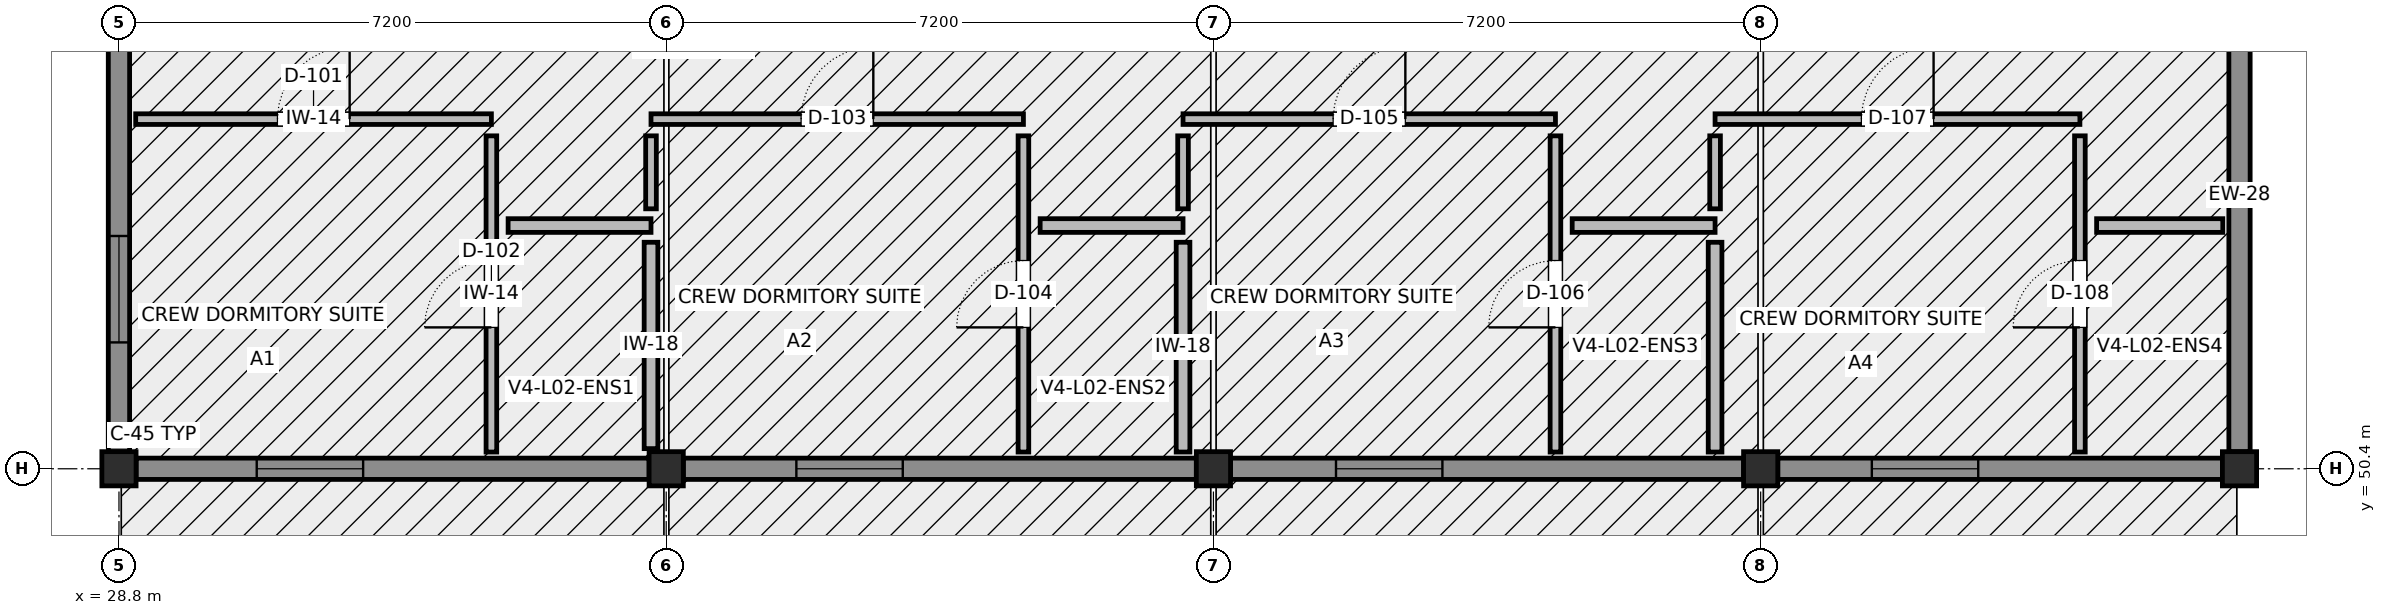
"""IFC4 building model, lengths in metres.
Left out: names, types, materials, properties, quantities, classifications, styles, units other than length and angle.
Written with IfcOpenShell. Run it as: python <this file> out.ifc"""

import sys

from ifc_helpers import new_model, si_unit, direction, frame, frame_2d, origin, origin_2d, place, context, subcontext, project, spatial, rectangle, extrude, element, fill, save


model = new_model("IFC4")
c1 = context("Model", 3, precision=1e-05, world=origin(), true_north=direction((0.0, 1.0)))
c2 = subcontext(c1, "Body", "Model", "MODEL_VIEW")
j1 = project(units=[si_unit("LENGTHUNIT", "METRE"), si_unit("PLANEANGLEUNIT", "RADIAN")], contexts=[c1])
p1 = place(None, origin())
s1 = spatial("IfcSite", under=j1, at=p1, CompositionType="ELEMENT")
p2 = place(p1, origin())
s2 = spatial("IfcBuilding", under=s1, at=p2, CompositionType="ELEMENT")
p3 = place(p2, frame((0.0, 0.0, 9.6)))
s3 = spatial("IfcBuildingStorey", under=s2, at=p3, CompositionType="ELEMENT", Elevation=9.6)
for number, where, z_axis, x_axis in (
    (1, (28.8, 50.4, 0.0), (0.0, 0.0, 1.0), (1.0, 0.0, 0.0)),
    (2, (36.0, 50.4, 0.0), (0.0, 0.0, 1.0), (1.0, 0.0, 0.0)),
    (3, (43.2, 50.4, 0.0), (0.0, 0.0, 1.0), (1.0, 0.0, 0.0)),
    (4, (50.4, 50.4, 0.0), (0.0, 0.0, 1.0), (1.0, 0.0, 0.0)),
    (5, (56.7, 50.4, 0.0), (0.0, 0.0, 1.0), (1.0, 0.0, 0.0)),
):
    element("IfcColumn", number, at=place(p3, frame(where, z_axis=z_axis, x_axis=x_axis)), inside=s3, PredefinedType="COLUMN", context=c2, shape_type="SweptSolid", body=[
        extrude(rectangle(XDim=0.45, YDim=0.45, at=origin_2d()), origin(), (0.0, 0.0, 1.0), 3.9),
    ])
p4 = place(p3, frame((56.7, 50.625, 0.0), z_axis=(0.0, 0.0, 1.0), x_axis=(0.0, 1.0, 0.0)))
e6 = element("IfcWall", 6, at=p4, inside=s3, PredefinedType="ELEMENTEDWALL", context=c2, shape_type="SweptSolid", body=[
    extrude(rectangle(XDim=6.75, YDim=0.28, at=frame_2d((3.375, 0.0))), origin(), (0.0, 0.0, 1.0), 3.473),
])
p5 = place(p3, frame((28.8, 57.375, 0.0), z_axis=(0.0, 0.0, 1.0), x_axis=(0.0, -1.0, 0.0)))
e7 = element("IfcWall", 7, at=p5, inside=s3, PredefinedType="ELEMENTEDWALL", context=c2, shape_type="SweptSolid", body=[
    extrude(rectangle(XDim=6.75, YDim=0.28, at=frame_2d((3.375, 0.0))), origin(), (0.0, 0.0, 1.0), 3.473),
])
p6 = place(p5, frame((3.913, 0.0, 0.85)))
e8 = element("IfcOpeningElement", 8, at=p6, cuts=e7, PredefinedType="OPENING", context=c2, shape_type="SweptSolid", body=[
    extrude(rectangle(XDim=1.4, YDim=1.65, at=frame_2d((0.7, 0.825))), frame((0.0, 0.152, 0.0), z_axis=(0.0, -1.0, 0.0), x_axis=(1.0, 0.0, 0.0)), (0.0, 0.0, 1.0), 0.304),
])
p7 = place(p3, frame((29.025, 50.4, 0.0), z_axis=(0.0, 0.0, 1.0), x_axis=(1.0, 0.0, 0.0)))
e9 = element("IfcWall", 9, at=p7, inside=s3, PredefinedType="ELEMENTEDWALL", context=c2, shape_type="SweptSolid", body=[
    extrude(rectangle(XDim=6.75, YDim=0.28, at=frame_2d((3.375, 0.0))), origin(), (0.0, 0.0, 1.0), 3.475),
])
p8 = place(p7, frame((1.587, 0.0, 0.85)))
e10 = element("IfcOpeningElement", 10, at=p8, cuts=e9, PredefinedType="OPENING", context=c2, shape_type="SweptSolid", body=[
    extrude(rectangle(XDim=1.4, YDim=1.65, at=frame_2d((0.7, 0.825))), frame((0.0, 0.152, 0.0), z_axis=(0.0, -1.0, 0.0), x_axis=(1.0, 0.0, 0.0)), (0.0, 0.0, 1.0), 0.304),
])
p9 = place(p3, frame((36.225, 50.4, 0.0), z_axis=(0.0, 0.0, 1.0), x_axis=(1.0, 0.0, 0.0)))
e11 = element("IfcWall", 11, at=p9, inside=s3, PredefinedType="ELEMENTEDWALL", context=c2, shape_type="SweptSolid", body=[
    extrude(rectangle(XDim=6.75, YDim=0.28, at=frame_2d((3.375, 0.0))), origin(), (0.0, 0.0, 1.0), 3.475),
])
p10 = place(p9, frame((1.488, 0.0, 0.85)))
e12 = element("IfcOpeningElement", 12, at=p10, cuts=e11, PredefinedType="OPENING", context=c2, shape_type="SweptSolid", body=[
    extrude(rectangle(XDim=1.4, YDim=1.65, at=frame_2d((0.7, 0.825))), frame((0.0, 0.152, 0.0), z_axis=(0.0, -1.0, 0.0), x_axis=(1.0, 0.0, 0.0)), (0.0, 0.0, 1.0), 0.304),
])
p11 = place(p3, frame((43.425, 50.4, 0.0), z_axis=(0.0, 0.0, 1.0), x_axis=(1.0, 0.0, 0.0)))
e13 = element("IfcWall", 13, at=p11, inside=s3, PredefinedType="ELEMENTEDWALL", context=c2, shape_type="SweptSolid", body=[
    extrude(rectangle(XDim=6.75, YDim=0.28, at=frame_2d((3.375, 0.0))), origin(), (0.0, 0.0, 1.0), 3.475),
])
p12 = place(p11, frame((1.387, 0.0, 0.85)))
e14 = element("IfcOpeningElement", 14, at=p12, cuts=e13, PredefinedType="OPENING", context=c2, shape_type="SweptSolid", body=[
    extrude(rectangle(XDim=1.4, YDim=1.65, at=frame_2d((0.7, 0.825))), frame((0.0, 0.152, 0.0), z_axis=(0.0, -1.0, 0.0), x_axis=(1.0, 0.0, 0.0)), (0.0, 0.0, 1.0), 0.304),
])
p13 = place(p3, frame((50.625, 50.4, 0.0), z_axis=(0.0, 0.0, 1.0), x_axis=(1.0, 0.0, 0.0)))
e15 = element("IfcWall", 15, at=p13, inside=s3, PredefinedType="ELEMENTEDWALL", context=c2, shape_type="SweptSolid", body=[
    extrude(rectangle(XDim=5.85, YDim=0.28, at=frame_2d((2.925, 0.0))), origin(), (0.0, 0.0, 1.0), 3.475),
])
p14 = place(p13, frame((1.238, 0.0, 0.85)))
e16 = element("IfcOpeningElement", 16, at=p14, cuts=e15, PredefinedType="OPENING", context=c2, shape_type="SweptSolid", body=[
    extrude(rectangle(XDim=1.4, YDim=1.65, at=frame_2d((0.7, 0.825))), frame((0.0, 0.152, 0.0), z_axis=(0.0, -1.0, 0.0), x_axis=(1.0, 0.0, 0.0)), (0.0, 0.0, 1.0), 0.304),
])
p15 = place(p3, frame((28.8, 50.75, 3.95), z_axis=(0.0, 0.0, 1.0), x_axis=(0.0, 1.0, 0.0)))
e17 = element("IfcWall", 17, at=p15, inside=s3, PredefinedType="ELEMENTEDWALL", context=c2, shape_type="SweptSolid", body=[
    extrude(rectangle(XDim=13.7, YDim=0.28, at=frame_2d((6.85, 0.0))), origin(), (0.0, 0.0, 1.0), 2.23),
])
p16 = place(p3, frame((29.02, 55.0, 0.0), z_axis=(0.0, 0.0, 1.0), x_axis=(1.0, 0.0, 0.0)))
e18 = element("IfcWall", 18, at=p16, inside=s3, PredefinedType="PARTITIONING", context=c2, shape_type="SweptSolid", body=[
    extrude(rectangle(XDim=4.68, YDim=0.14, at=frame_2d((2.34, 0.0))), origin(), (0.0, 0.0, 1.0), 3.62),
])
p17 = place(p16, frame((1.865, 0.0, 0.0)))
e19 = element("IfcOpeningElement", 19, at=p17, cuts=e18, PredefinedType="OPENING", context=c2, shape_type="SweptSolid", body=[
    extrude(rectangle(XDim=0.95, YDim=2.1, at=frame_2d((0.475, 1.05))), frame((0.0, 0.082, 0.0), z_axis=(0.0, -1.0, 0.0), x_axis=(1.0, 0.0, 0.0)), (0.0, 0.0, 1.0), 0.164),
])
p18 = place(p3, frame((33.7, 50.62, 0.0), z_axis=(0.0, 0.0, 1.0), x_axis=(0.0, 1.0, 0.0)))
e20 = element("IfcWall", 20, at=p18, inside=s3, PredefinedType="PARTITIONING", context=c2, shape_type="SweptSolid", body=[
    extrude(rectangle(XDim=4.16, YDim=0.14, at=frame_2d((2.08, 0.0))), origin(), (0.0, 0.0, 1.0), 3.62),
])
p19 = place(p18, frame((1.64, 0.0, 0.0)))
e21 = element("IfcOpeningElement", 21, at=p19, cuts=e20, PredefinedType="OPENING", context=c2, shape_type="SweptSolid", body=[
    extrude(rectangle(XDim=0.88, YDim=2.08, at=frame_2d((0.44, 1.04))), frame((0.0, 0.082, 0.0), z_axis=(0.0, -1.0, 0.0), x_axis=(1.0, 0.0, 0.0)), (0.0, 0.0, 1.0), 0.164),
])
p20 = place(p3, frame((33.92, 53.6, 0.0), z_axis=(0.0, 0.0, 1.0), x_axis=(1.0, 0.0, 0.0)))
e22 = element("IfcWall", 22, at=p20, inside=s3, PredefinedType="PLUMBINGWALL", context=c2, shape_type="SweptSolid", body=[
    extrude(rectangle(XDim=1.88, YDim=0.18, at=frame_2d((0.94, 0.0))), origin(), (0.0, 0.0, 1.0), 3.62),
])
p21 = place(p3, frame((35.8, 50.665, 0.0), z_axis=(0.0, 0.0, 1.0), x_axis=(0.0, 1.0, 0.0)))
e23 = element("IfcWall", 23, at=p21, inside=s3, PredefinedType="PLUMBINGWALL", context=c2, shape_type="SweptSolid", body=[
    extrude(rectangle(XDim=2.715, YDim=0.18, at=frame_2d((1.357, 0.0))), origin(), (0.0, 0.0, 1.0), 3.471),
])
p22 = place(p3, frame((35.8, 55.0, 0.0), z_axis=(0.0, 0.0, 1.0), x_axis=(1.0, 0.0, 0.0)))
e24 = element("IfcWall", 24, at=p22, inside=s3, PredefinedType="PARTITIONING", context=c2, shape_type="SweptSolid", body=[
    extrude(rectangle(XDim=4.9, YDim=0.14, at=frame_2d((2.45, 0.0))), origin(), (0.0, 0.0, 1.0), 3.471),
])
p23 = place(p22, frame((1.975, 0.0, 0.0)))
e25 = element("IfcOpeningElement", 25, at=p23, cuts=e24, PredefinedType="OPENING", context=c2, shape_type="SweptSolid", body=[
    extrude(rectangle(XDim=0.95, YDim=2.1, at=frame_2d((0.475, 1.05))), frame((0.0, 0.082, 0.0), z_axis=(0.0, -1.0, 0.0), x_axis=(1.0, 0.0, 0.0)), (0.0, 0.0, 1.0), 0.164),
])
p24 = place(p3, frame((40.7, 50.62, 0.0), z_axis=(0.0, 0.0, 1.0), x_axis=(0.0, 1.0, 0.0)))
e26 = element("IfcWall", 26, at=p24, inside=s3, PredefinedType="PARTITIONING", context=c2, shape_type="SweptSolid", body=[
    extrude(rectangle(XDim=4.16, YDim=0.14, at=frame_2d((2.08, 0.0))), origin(), (0.0, 0.0, 1.0), 3.62),
])
p25 = place(p24, frame((1.64, 0.0, 0.0)))
e27 = element("IfcOpeningElement", 27, at=p25, cuts=e26, PredefinedType="OPENING", context=c2, shape_type="SweptSolid", body=[
    extrude(rectangle(XDim=0.88, YDim=2.08, at=frame_2d((0.44, 1.04))), frame((0.0, 0.082, 0.0), z_axis=(0.0, -1.0, 0.0), x_axis=(1.0, 0.0, 0.0)), (0.0, 0.0, 1.0), 0.164),
])
p26 = place(p3, frame((35.8, 53.82, 0.0), z_axis=(0.0, 0.0, 1.0), x_axis=(0.0, 1.0, 0.0)))
e28 = element("IfcWall", 28, at=p26, inside=s3, PredefinedType="PARTITIONING", context=c2, shape_type="SweptSolid", body=[
    extrude(rectangle(XDim=0.96, YDim=0.14, at=frame_2d((0.48, 0.0))), origin(), (0.0, 0.0, 1.0), 3.471),
])
p27 = place(p3, frame((40.92, 53.6, 0.0), z_axis=(0.0, 0.0, 1.0), x_axis=(1.0, 0.0, 0.0)))
e29 = element("IfcWall", 29, at=p27, inside=s3, PredefinedType="PLUMBINGWALL", context=c2, shape_type="SweptSolid", body=[
    extrude(rectangle(XDim=1.88, YDim=0.18, at=frame_2d((0.94, 0.0))), origin(), (0.0, 0.0, 1.0), 3.62),
])
p28 = place(p3, frame((42.8, 50.62, 0.0), z_axis=(0.0, 0.0, 1.0), x_axis=(0.0, 1.0, 0.0)))
e30 = element("IfcWall", 30, at=p28, inside=s3, PredefinedType="PLUMBINGWALL", context=c2, shape_type="SweptSolid", body=[
    extrude(rectangle(XDim=2.76, YDim=0.18, at=frame_2d((1.38, 0.0))), origin(), (0.0, 0.0, 1.0), 3.62),
])
p29 = place(p3, frame((42.8, 55.0, 0.0), z_axis=(0.0, 0.0, 1.0), x_axis=(1.0, 0.0, 0.0)))
e31 = element("IfcWall", 31, at=p29, inside=s3, PredefinedType="PARTITIONING", context=c2, shape_type="SweptSolid", body=[
    extrude(rectangle(XDim=4.9, YDim=0.14, at=frame_2d((2.45, 0.0))), origin(), (0.0, 0.0, 1.0), 3.471),
])
p30 = place(p29, frame((1.975, 0.0, 0.0)))
e32 = element("IfcOpeningElement", 32, at=p30, cuts=e31, PredefinedType="OPENING", context=c2, shape_type="SweptSolid", body=[
    extrude(rectangle(XDim=0.95, YDim=2.1, at=frame_2d((0.475, 1.05))), frame((0.0, 0.082, 0.0), z_axis=(0.0, -1.0, 0.0), x_axis=(1.0, 0.0, 0.0)), (0.0, 0.0, 1.0), 0.164),
])
p31 = place(p3, frame((47.7, 50.62, 0.0), z_axis=(0.0, 0.0, 1.0), x_axis=(0.0, 1.0, 0.0)))
e33 = element("IfcWall", 33, at=p31, inside=s3, PredefinedType="PARTITIONING", context=c2, shape_type="SweptSolid", body=[
    extrude(rectangle(XDim=4.16, YDim=0.14, at=frame_2d((2.08, 0.0))), origin(), (0.0, 0.0, 1.0), 3.62),
])
p32 = place(p31, frame((1.64, 0.0, 0.0)))
e34 = element("IfcOpeningElement", 34, at=p32, cuts=e33, PredefinedType="OPENING", context=c2, shape_type="SweptSolid", body=[
    extrude(rectangle(XDim=0.88, YDim=2.08, at=frame_2d((0.44, 1.04))), frame((0.0, 0.082, 0.0), z_axis=(0.0, -1.0, 0.0), x_axis=(1.0, 0.0, 0.0)), (0.0, 0.0, 1.0), 0.164),
])
p33 = place(p3, frame((42.8, 53.82, 0.0), z_axis=(0.0, 0.0, 1.0), x_axis=(0.0, 1.0, 0.0)))
e35 = element("IfcWall", 35, at=p33, inside=s3, PredefinedType="PARTITIONING", context=c2, shape_type="SweptSolid", body=[
    extrude(rectangle(XDim=0.96, YDim=0.14, at=frame_2d((0.48, 0.0))), origin(), (0.0, 0.0, 1.0), 3.62),
])
p34 = place(p3, frame((47.92, 53.6, 0.0), z_axis=(0.0, 0.0, 1.0), x_axis=(1.0, 0.0, 0.0)))
e36 = element("IfcWall", 36, at=p34, inside=s3, PredefinedType="PLUMBINGWALL", context=c2, shape_type="SweptSolid", body=[
    extrude(rectangle(XDim=1.88, YDim=0.18, at=frame_2d((0.94, 0.0))), origin(), (0.0, 0.0, 1.0), 3.62),
])
p35 = place(p3, frame((49.8, 50.62, 0.0), z_axis=(0.0, 0.0, 1.0), x_axis=(0.0, 1.0, 0.0)))
e37 = element("IfcWall", 37, at=p35, inside=s3, PredefinedType="PLUMBINGWALL", context=c2, shape_type="SweptSolid", body=[
    extrude(rectangle(XDim=2.76, YDim=0.18, at=frame_2d((1.38, 0.0))), origin(), (0.0, 0.0, 1.0), 3.62),
])
p36 = place(p3, frame((49.8, 55.0, 0.0), z_axis=(0.0, 0.0, 1.0), x_axis=(1.0, 0.0, 0.0)))
e38 = element("IfcWall", 38, at=p36, inside=s3, PredefinedType="PARTITIONING", context=c2, shape_type="SweptSolid", body=[
    extrude(rectangle(XDim=4.8, YDim=0.14, at=frame_2d((2.4, 0.0))), origin(), (0.0, 0.0, 1.0), 3.471),
])
p37 = place(p36, frame((1.925, 0.0, 0.0)))
e39 = element("IfcOpeningElement", 39, at=p37, cuts=e38, PredefinedType="OPENING", context=c2, shape_type="SweptSolid", body=[
    extrude(rectangle(XDim=0.95, YDim=2.1, at=frame_2d((0.475, 1.05))), frame((0.0, 0.082, 0.0), z_axis=(0.0, -1.0, 0.0), x_axis=(1.0, 0.0, 0.0)), (0.0, 0.0, 1.0), 0.164),
])
p38 = place(p3, frame((54.6, 50.62, 0.0), z_axis=(0.0, 0.0, 1.0), x_axis=(0.0, 1.0, 0.0)))
e40 = element("IfcWall", 40, at=p38, inside=s3, PredefinedType="PARTITIONING", context=c2, shape_type="SweptSolid", body=[
    extrude(rectangle(XDim=4.16, YDim=0.14, at=frame_2d((2.08, 0.0))), origin(), (0.0, 0.0, 1.0), 3.62),
])
p39 = place(p38, frame((1.64, 0.0, 0.0)))
e41 = element("IfcOpeningElement", 41, at=p39, cuts=e40, PredefinedType="OPENING", context=c2, shape_type="SweptSolid", body=[
    extrude(rectangle(XDim=0.88, YDim=2.08, at=frame_2d((0.44, 1.04))), frame((0.0, 0.082, 0.0), z_axis=(0.0, -1.0, 0.0), x_axis=(1.0, 0.0, 0.0)), (0.0, 0.0, 1.0), 0.164),
])
p40 = place(p3, frame((49.8, 53.82, 0.0), z_axis=(0.0, 0.0, 1.0), x_axis=(0.0, 1.0, 0.0)))
e42 = element("IfcWall", 42, at=p40, inside=s3, PredefinedType="PARTITIONING", context=c2, shape_type="SweptSolid", body=[
    extrude(rectangle(XDim=0.96, YDim=0.14, at=frame_2d((0.48, 0.0))), origin(), (0.0, 0.0, 1.0), 3.62),
])
p41 = place(p3, frame((54.82, 53.6, 0.0), z_axis=(0.0, 0.0, 1.0), x_axis=(1.0, 0.0, 0.0)))
e43 = element("IfcWall", 43, at=p41, inside=s3, PredefinedType="PLUMBINGWALL", context=c2, shape_type="SweptSolid", body=[
    extrude(rectangle(XDim=1.66, YDim=0.18, at=frame_2d((0.83, 0.0))), origin(), (0.0, 0.0, 1.0), 3.62),
])
p42 = place(p6, origin())
e44 = element("IfcWindow", 44, at=p42, inside=s3, PartitioningType="SINGLE_PANEL", PredefinedType="WINDOW", context=c2, shape_type="SweptSolid", body=[
    extrude(rectangle(XDim=1.4, YDim=1.65, at=frame_2d((0.7, 0.825))), frame((0.0, 0.03, 0.0), z_axis=(0.0, -1.0, 0.0), x_axis=(1.0, 0.0, 0.0)), (0.0, 0.0, 1.0), 0.06),
])
fill(e8, e44)
p43 = place(p8, origin())
e45 = element("IfcWindow", 45, at=p43, inside=s3, PartitioningType="SINGLE_PANEL", PredefinedType="WINDOW", context=c2, shape_type="SweptSolid", body=[
    extrude(rectangle(XDim=1.4, YDim=1.65, at=frame_2d((0.7, 0.825))), frame((0.0, 0.03, 0.0), z_axis=(0.0, -1.0, 0.0), x_axis=(1.0, 0.0, 0.0)), (0.0, 0.0, 1.0), 0.06),
])
fill(e10, e45)
p44 = place(p10, origin())
e46 = element("IfcWindow", 46, at=p44, inside=s3, PartitioningType="SINGLE_PANEL", PredefinedType="WINDOW", context=c2, shape_type="SweptSolid", body=[
    extrude(rectangle(XDim=1.4, YDim=1.65, at=frame_2d((0.7, 0.825))), frame((0.0, 0.03, 0.0), z_axis=(0.0, -1.0, 0.0), x_axis=(1.0, 0.0, 0.0)), (0.0, 0.0, 1.0), 0.06),
])
fill(e12, e46)
p45 = place(p12, origin())
e47 = element("IfcWindow", 47, at=p45, inside=s3, PartitioningType="SINGLE_PANEL", PredefinedType="WINDOW", context=c2, shape_type="SweptSolid", body=[
    extrude(rectangle(XDim=1.4, YDim=1.65, at=frame_2d((0.7, 0.825))), frame((0.0, 0.03, 0.0), z_axis=(0.0, -1.0, 0.0), x_axis=(1.0, 0.0, 0.0)), (0.0, 0.0, 1.0), 0.06),
])
fill(e14, e47)
p46 = place(p14, origin())
e48 = element("IfcWindow", 48, at=p46, inside=s3, PartitioningType="SINGLE_PANEL", PredefinedType="WINDOW", context=c2, shape_type="SweptSolid", body=[
    extrude(rectangle(XDim=1.4, YDim=1.65, at=frame_2d((0.7, 0.825))), frame((0.0, 0.03, 0.0), z_axis=(0.0, -1.0, 0.0), x_axis=(1.0, 0.0, 0.0)), (0.0, 0.0, 1.0), 0.06),
])
fill(e16, e48)
p47 = place(p17, origin())
e49 = element("IfcDoor", 49, at=p47, inside=s3, OperationType="SINGLE_SWING_RIGHT", PredefinedType="DOOR", context=c2, shape_type="SweptSolid", body=[
    extrude(rectangle(XDim=0.95, YDim=2.1, at=frame_2d((0.475, 1.05))), frame((0.0, 0.025, 0.0), z_axis=(0.0, -1.0, 0.0), x_axis=(1.0, 0.0, 0.0)), (0.0, 0.0, 1.0), 0.05),
])
fill(e19, e49)
p48 = place(p19, origin())
e50 = element("IfcDoor", 50, at=p48, inside=s3, OperationType="SINGLE_SWING_LEFT", PredefinedType="DOOR", context=c2, shape_type="SweptSolid", body=[
    extrude(rectangle(XDim=0.88, YDim=2.08, at=frame_2d((0.44, 1.04))), frame((0.0, 0.025, 0.0), z_axis=(0.0, -1.0, 0.0), x_axis=(1.0, 0.0, 0.0)), (0.0, 0.0, 1.0), 0.05),
])
fill(e21, e50)
p49 = place(p23, origin())
e51 = element("IfcDoor", 51, at=p49, inside=s3, OperationType="SINGLE_SWING_RIGHT", PredefinedType="DOOR", context=c2, shape_type="SweptSolid", body=[
    extrude(rectangle(XDim=0.95, YDim=2.1, at=frame_2d((0.475, 1.05))), frame((0.0, 0.025, 0.0), z_axis=(0.0, -1.0, 0.0), x_axis=(1.0, 0.0, 0.0)), (0.0, 0.0, 1.0), 0.05),
])
fill(e25, e51)
p50 = place(p25, origin())
e52 = element("IfcDoor", 52, at=p50, inside=s3, OperationType="SINGLE_SWING_LEFT", PredefinedType="DOOR", context=c2, shape_type="SweptSolid", body=[
    extrude(rectangle(XDim=0.88, YDim=2.08, at=frame_2d((0.44, 1.04))), frame((0.0, 0.025, 0.0), z_axis=(0.0, -1.0, 0.0), x_axis=(1.0, 0.0, 0.0)), (0.0, 0.0, 1.0), 0.05),
])
fill(e27, e52)
p51 = place(p30, origin())
e53 = element("IfcDoor", 53, at=p51, inside=s3, OperationType="SINGLE_SWING_RIGHT", PredefinedType="DOOR", context=c2, shape_type="SweptSolid", body=[
    extrude(rectangle(XDim=0.95, YDim=2.1, at=frame_2d((0.475, 1.05))), frame((0.0, 0.025, 0.0), z_axis=(0.0, -1.0, 0.0), x_axis=(1.0, 0.0, 0.0)), (0.0, 0.0, 1.0), 0.05),
])
fill(e32, e53)
p52 = place(p32, origin())
e54 = element("IfcDoor", 54, at=p52, inside=s3, OperationType="SINGLE_SWING_LEFT", PredefinedType="DOOR", context=c2, shape_type="SweptSolid", body=[
    extrude(rectangle(XDim=0.88, YDim=2.08, at=frame_2d((0.44, 1.04))), frame((0.0, 0.025, 0.0), z_axis=(0.0, -1.0, 0.0), x_axis=(1.0, 0.0, 0.0)), (0.0, 0.0, 1.0), 0.05),
])
fill(e34, e54)
p53 = place(p37, origin())
e55 = element("IfcDoor", 55, at=p53, inside=s3, OperationType="SINGLE_SWING_RIGHT", PredefinedType="DOOR", context=c2, shape_type="SweptSolid", body=[
    extrude(rectangle(XDim=0.95, YDim=2.1, at=frame_2d((0.475, 1.05))), frame((0.0, 0.025, 0.0), z_axis=(0.0, -1.0, 0.0), x_axis=(1.0, 0.0, 0.0)), (0.0, 0.0, 1.0), 0.05),
])
fill(e39, e55)
p54 = place(p39, origin())
e56 = element("IfcDoor", 56, at=p54, inside=s3, OperationType="SINGLE_SWING_LEFT", PredefinedType="DOOR", context=c2, shape_type="SweptSolid", body=[
    extrude(rectangle(XDim=0.88, YDim=2.08, at=frame_2d((0.44, 1.04))), frame((0.0, 0.025, 0.0), z_axis=(0.0, -1.0, 0.0), x_axis=(1.0, 0.0, 0.0)), (0.0, 0.0, 1.0), 0.05),
])
fill(e41, e56)
save(model, sys.argv[1])
